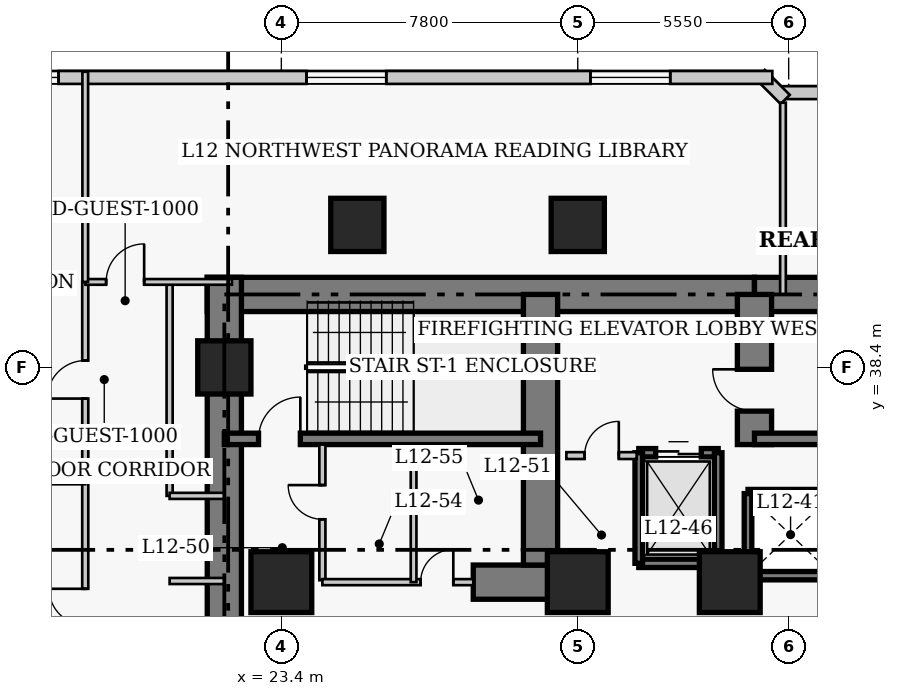
"""IFC4 building model, lengths in metres.
Left out: names, types, materials, properties, quantities, classifications, styles, units other than length and angle.
Written with IfcOpenShell. Run it as: python <this file> out.ifc"""

import sys

from ifc_helpers import new_model, si_unit, direction, frame, frame_2d, origin, origin_2d, place, context, subcontext, project, spatial, rectangle, extrude, element, fill, save


model = new_model("IFC4")
c1 = context("Model", 3, precision=1e-05, world=origin(), true_north=direction((0.0, 1.0)))
c2 = subcontext(c1, "Body", "Model", "MODEL_VIEW")
j1 = project(units=[si_unit("LENGTHUNIT", "METRE"), si_unit("PLANEANGLEUNIT", "RADIAN")], contexts=[c1])
p1 = place(None, origin())
s1 = spatial("IfcSite", under=j1, at=p1, CompositionType="ELEMENT")
p2 = place(p1, origin())
s2 = spatial("IfcBuilding", under=s1, at=p2, CompositionType="ELEMENT")
p3 = place(p2, frame((0.0, 0.0, 52.6)))
s3 = spatial("IfcBuildingStorey", under=s2, at=p3, CompositionType="ELEMENT", Elevation=52.6)
p4 = place(p3, frame((21.45, 40.32, 0.0), z_axis=(0.0, 0.0, 1.0), x_axis=(1.0, 0.0, 0.0)))
e1 = element("IfcWall", 1, at=p4, inside=s3, PredefinedType="SHEAR", context=c2, shape_type="SweptSolid", body=[
    extrude(rectangle(XDim=14.4, YDim=0.9, at=frame_2d((7.2, 0.0))), origin(), (0.0, 0.0, 1.0), 3.8),
])
p5 = place(p3, frame((35.85, 40.32, 0.0), z_axis=(0.0, 0.0, 1.0), x_axis=(1.0, 0.0, 0.0)))
e2 = element("IfcWall", 2, at=p5, inside=s3, PredefinedType="SHEAR", context=c2, shape_type="SweptSolid", body=[
    extrude(rectangle(XDim=12.6, YDim=0.9, at=frame_2d((6.3, 0.0))), origin(), (0.0, 0.0, 1.0), 3.8),
])
p6 = place(p3, frame((21.9, 27.05, 0.0), z_axis=(0.0, 0.0, 1.0), x_axis=(0.0, 1.0, 0.0)))
e3 = element("IfcWall", 3, at=p6, inside=s3, PredefinedType="SHEAR", context=c2, shape_type="SweptSolid", body=[
    extrude(rectangle(XDim=13.72, YDim=0.9, at=frame_2d((6.86, 0.0))), origin(), (0.0, 0.0, 1.0), 3.8),
])
p7 = place(p3, frame((28.45, 32.75, 0.0), z_axis=(0.0, 0.0, 1.0), x_axis=(1.0, 0.0, 0.0)))
e4 = element("IfcWall", 4, at=p7, inside=s3, PredefinedType="SHEAR", context=c2, shape_type="SweptSolid", body=[
    extrude(rectangle(XDim=2.4, YDim=0.9, at=frame_2d((1.2, 0.0))), origin(), (0.0, 0.0, 1.0), 3.8),
])
p8 = place(p3, frame((30.22, 33.2, 0.0), z_axis=(0.0, 0.0, 1.0), x_axis=(0.0, 1.0, 0.0)))
e5 = element("IfcWall", 5, at=p8, inside=s3, PredefinedType="SHEAR", context=c2, shape_type="SweptSolid", body=[
    extrude(rectangle(XDim=7.12, YDim=0.9, at=frame_2d((3.56, 0.0))), origin(), (0.0, 0.0, 1.0), 3.8),
])
p9 = place(p3, frame((35.85, 36.37, 0.0), z_axis=(0.0, 0.0, 1.0), x_axis=(0.0, 1.0, 0.0)))
e6 = element("IfcWall", 6, at=p9, inside=s3, PredefinedType="SHEAR", context=c2, shape_type="SweptSolid", body=[
    extrude(rectangle(XDim=3.95, YDim=0.9, at=frame_2d((1.975, 0.0))), origin(), (0.0, 0.0, 1.0), 3.8),
])
p10 = place(p9, frame((0.88, 0.0, 0.0)))
e7 = element("IfcOpeningElement", 7, at=p10, cuts=e6, PredefinedType="OPENING", context=c2, shape_type="SweptSolid", body=[
    extrude(rectangle(XDim=1.1, YDim=2.15, at=frame_2d((0.55, 1.075))), frame((0.0, 0.46, 0.0), z_axis=(0.0, -1.0, 0.0), x_axis=(1.0, 0.0, 0.0)), (0.0, 0.0, 1.0), 0.92),
])
p11 = place(p3, frame((21.9, 36.52, 0.0), z_axis=(0.0, 0.0, 1.0), x_axis=(1.0, 0.0, 0.0)))
e8 = element("IfcWall", 8, at=p11, inside=s3, PredefinedType="SHEAR", context=c2, shape_type="SweptSolid", body=[
    extrude(rectangle(XDim=8.32, YDim=0.3, at=frame_2d((4.16, 0.0))), origin(), (0.0, 0.0, 1.0), 3.8),
])
p12 = place(p11, frame((0.9, 0.0, 0.0)))
e9 = element("IfcOpeningElement", 9, at=p12, cuts=e8, PredefinedType="OPENING", context=c2, shape_type="SweptSolid", body=[
    extrude(rectangle(XDim=1.1, YDim=2.15, at=frame_2d((0.55, 1.075))), frame((0.0, 0.16, 0.0), z_axis=(0.0, -1.0, 0.0), x_axis=(1.0, 0.0, 0.0)), (0.0, 0.0, 1.0), 0.32),
])
p13 = place(p3, frame((35.85, 36.52, 0.0), z_axis=(0.0, 0.0, 1.0), x_axis=(1.0, 0.0, 0.0)))
e10 = element("IfcWall", 10, at=p13, inside=s3, PredefinedType="SHEAR", context=c2, shape_type="SweptSolid", body=[
    extrude(rectangle(XDim=8.33, YDim=0.3, at=frame_2d((4.165, 0.0))), origin(), (0.0, 0.0, 1.0), 3.8),
])
p14 = place(p3, frame((21.9, 38.4, 0.0), z_axis=(0.0, 0.0, 1.0), x_axis=(1.0, 0.0, 0.0)))
e11 = element("IfcColumn", 11, at=p14, inside=s3, PredefinedType="COLUMN", context=c2, shape_type="SweptSolid", body=[
    extrude(rectangle(XDim=1.4, YDim=1.4, at=origin_2d()), origin(), (0.0, 0.0, 1.0), 3.8),
])
for number, where, z_axis, x_axis in (
    (12, (23.4, 32.75, 0.0), (0.0, 0.0, 1.0), (1.0, 0.0, 0.0)),
    (13, (31.2, 32.75, 0.0), (0.0, 0.0, 1.0), (1.0, 0.0, 0.0)),
    (14, (35.2, 32.75, 0.0), (0.0, 0.0, 1.0), (1.0, 0.0, 0.0)),
):
    element("IfcColumn", number, at=place(p3, frame(where, z_axis=z_axis, x_axis=x_axis)), inside=s3, PredefinedType="COLUMN", context=c2, shape_type="SweptSolid", body=[
        extrude(rectangle(XDim=1.6, YDim=1.6, at=origin_2d()), origin(), (0.0, 0.0, 1.0), 3.8),
    ])
for number, where, z_axis, x_axis in (
    (15, (25.4, 42.15, 0.0), (0.0, 0.0, 1.0), (1.0, 0.0, 0.0)),
    (16, (31.2, 42.15, 0.0), (0.0, 0.0, 1.0), (1.0, 0.0, 0.0)),
):
    element("IfcColumn", number, at=place(p3, frame(where, z_axis=z_axis, x_axis=x_axis)), inside=s3, PredefinedType="COLUMN", context=c2, shape_type="SweptSolid", body=[
        extrude(rectangle(XDim=1.4, YDim=1.4, at=origin_2d()), origin(), (0.0, 0.0, 1.0), 3.8),
    ])
p15 = place(p3, frame((41.42, 45.63, 0.0), z_axis=(0.0, 0.0, 1.0), x_axis=(-1.0, 0.0, 0.0)))
e17 = element("IfcWall", 17, at=p15, inside=s3, PredefinedType="SOLIDWALL", context=c2, shape_type="SweptSolid", body=[
    extrude(rectangle(XDim=4.84, YDim=0.34, at=frame_2d((2.42, 0.0))), origin(), (0.0, 0.0, 1.0), 3.54),
])
p16 = place(p15, frame((1.37, 0.0, 0.85)))
e18 = element("IfcOpeningElement", 18, at=p16, cuts=e17, PredefinedType="OPENING", context=c2, shape_type="SweptSolid", body=[
    extrude(rectangle(XDim=2.1, YDim=1.85, at=frame_2d((1.05, 0.925))), frame((0.0, 0.18, 0.0), z_axis=(0.0, -1.0, 0.0), x_axis=(1.0, 0.0, 0.0)), (0.0, 0.0, 1.0), 0.36),
])
p17 = place(p3, frame((36.658, 45.451, 0.0), z_axis=(0.0, 0.0, 1.0), x_axis=(-0.707106781187, 0.707106781187, 0.0)))
e19 = element("IfcWall", 19, at=p17, inside=s3, PredefinedType="SOLIDWALL", context=c2, shape_type="SweptSolid", body=[
    extrude(rectangle(XDim=0.929, YDim=0.34, at=frame_2d((0.464, 0.0))), origin(), (0.0, 0.0, 1.0), 3.54),
])
p18 = place(p3, frame((36.32, 46.03, 0.0), z_axis=(0.0, 0.0, 1.0), x_axis=(-1.0, 0.0, 0.0)))
e20 = element("IfcWall", 20, at=p18, inside=s3, PredefinedType="SOLIDWALL", context=c2, shape_type="SweptSolid", body=[
    extrude(rectangle(XDim=29.89, YDim=0.34, at=frame_2d((14.945, 0.0))), origin(), (0.0, 0.0, 1.0), 3.54),
])
p19 = place(p18, frame((2.686, 0.0, 0.85)))
e21 = element("IfcOpeningElement", 21, at=p19, cuts=e20, PredefinedType="OPENING", context=c2, shape_type="SweptSolid", body=[
    extrude(rectangle(XDim=2.1, YDim=1.85, at=frame_2d((1.05, 0.925))), frame((0.0, 0.18, 0.0), z_axis=(0.0, -1.0, 0.0), x_axis=(1.0, 0.0, 0.0)), (0.0, 0.0, 1.0), 0.36),
])
p20 = place(p18, frame((10.159, 0.0, 0.85)))
e22 = element("IfcOpeningElement", 22, at=p20, cuts=e20, PredefinedType="OPENING", context=c2, shape_type="SweptSolid", body=[
    extrude(rectangle(XDim=2.1, YDim=1.85, at=frame_2d((1.05, 0.925))), frame((0.0, 0.18, 0.0), z_axis=(0.0, -1.0, 0.0), x_axis=(1.0, 0.0, 0.0)), (0.0, 0.0, 1.0), 0.36),
])
p21 = place(p18, frame((18.781, 0.0, 0.85)))
e23 = element("IfcOpeningElement", 23, at=p21, cuts=e20, PredefinedType="OPENING", context=c2, shape_type="SweptSolid", body=[
    extrude(rectangle(XDim=2.1, YDim=1.85, at=frame_2d((1.05, 0.925))), frame((0.0, 0.18, 0.0), z_axis=(0.0, -1.0, 0.0), x_axis=(1.0, 0.0, 0.0)), (0.0, 0.0, 1.0), 0.36),
])
p22 = place(p18, frame((25.104, 0.0, 0.85)))
e24 = element("IfcOpeningElement", 24, at=p22, cuts=e20, PredefinedType="OPENING", context=c2, shape_type="SweptSolid", body=[
    extrude(rectangle(XDim=2.1, YDim=1.85, at=frame_2d((1.05, 0.925))), frame((0.0, 0.18, 0.0), z_axis=(0.0, -1.0, 0.0), x_axis=(1.0, 0.0, 0.0)), (0.0, 0.0, 1.0), 0.36),
])
for number, where, z_axis, x_axis in (
    (25, (35.68, 35.08, 0.0), (0.0, 0.0, 1.0), (1.0, 0.0, 0.0)),
    (26, (35.68, 32.92, 0.0), (0.0, 0.0, 1.0), (1.0, 0.0, 0.0)),
):
    element("IfcWall", number, at=place(p3, frame(where, z_axis=z_axis, x_axis=x_axis)), inside=s3, PredefinedType="SHEAR", context=c2, shape_type="SweptSolid", body=[
        extrude(rectangle(XDim=2.32, YDim=0.22, at=frame_2d((1.16, 0.0))), origin(), (0.0, 0.0, 1.0), 3.8),
    ])
p23 = place(p3, frame((35.68, 32.92, 0.0), z_axis=(0.0, 0.0, 1.0), x_axis=(0.0, 1.0, 0.0)))
e27 = element("IfcWall", 27, at=p23, inside=s3, PredefinedType="SHEAR", context=c2, shape_type="SweptSolid", body=[
    extrude(rectangle(XDim=2.16, YDim=0.2, at=frame_2d((1.08, 0.0))), origin(), (0.0, 0.0, 1.0), 3.8),
])
p24 = place(p3, frame((32.805, 36.155, 0.0), z_axis=(0.0, 0.0, 1.0), x_axis=(1.0, 0.0, 0.0)))
e28 = element("IfcWall", 28, at=p24, inside=s3, PredefinedType="SHEAR", context=c2, shape_type="SweptSolid", body=[
    extrude(rectangle(XDim=2.09, YDim=0.22, at=frame_2d((1.045, 0.0))), origin(), (0.0, 0.0, 1.0), 3.8),
])
p25 = place(p24, frame((0.445, 0.0, 0.0)))
e29 = element("IfcOpeningElement", 29, at=p25, cuts=e28, PredefinedType="OPENING", context=c2, shape_type="SweptSolid", body=[
    extrude(rectangle(XDim=1.2, YDim=2.15, at=frame_2d((0.6, 1.075))), frame((0.0, 0.12, 0.0), z_axis=(0.0, -1.0, 0.0), x_axis=(1.0, 0.0, 0.0)), (0.0, 0.0, 1.0), 0.24),
])
p26 = place(p3, frame((32.805, 33.245, 0.0), z_axis=(0.0, 0.0, 1.0), x_axis=(1.0, 0.0, 0.0)))
e30 = element("IfcWall", 30, at=p26, inside=s3, PredefinedType="SHEAR", context=c2, shape_type="SweptSolid", body=[
    extrude(rectangle(XDim=2.09, YDim=0.22, at=frame_2d((1.045, 0.0))), origin(), (0.0, 0.0, 1.0), 3.8),
])
for number, where, z_axis, x_axis in (
    (31, (32.805, 33.245, 0.0), (0.0, 0.0, 1.0), (0.0, 1.0, 0.0)),
    (32, (34.895, 33.245, 0.0), (0.0, 0.0, 1.0), (0.0, 1.0, 0.0)),
):
    element("IfcWall", number, at=place(p3, frame(where, z_axis=z_axis, x_axis=x_axis)), inside=s3, PredefinedType="SHEAR", context=c2, shape_type="SweptSolid", body=[
        extrude(rectangle(XDim=2.91, YDim=0.2, at=frame_2d((1.455, 0.0))), origin(), (0.0, 0.0, 1.0), 3.8),
    ])
p27 = place(p3, frame((30.9, 36.08, 0.0), z_axis=(0.0, 0.0, 1.0), x_axis=(1.0, 0.0, 0.0)))
e33 = element("IfcWall", 33, at=p27, inside=s3, PredefinedType="PARTITIONING", context=c2, shape_type="SweptSolid", body=[
    extrude(rectangle(XDim=1.85, YDim=0.18, at=frame_2d((0.925, 0.0))), origin(), (0.0, 0.0, 1.0), 3.54),
])
p28 = place(p27, frame((0.48, 0.0, 0.0)))
e34 = element("IfcOpeningElement", 34, at=p28, cuts=e33, PredefinedType="OPENING", context=c2, shape_type="SweptSolid", body=[
    extrude(rectangle(XDim=0.9, YDim=2.15, at=frame_2d((0.45, 1.075))), frame((0.0, 0.1, 0.0), z_axis=(0.0, -1.0, 0.0), x_axis=(1.0, 0.0, 0.0)), (0.0, 0.0, 1.0), 0.2),
])
p29 = place(p3, frame((24.48, 32.8, 0.0), z_axis=(0.0, 0.0, 1.0), x_axis=(0.0, 1.0, 0.0)))
e35 = element("IfcWall", 35, at=p29, inside=s3, PredefinedType="PARTITIONING", context=c2, shape_type="SweptSolid", body=[
    extrude(rectangle(XDim=3.57, YDim=0.16, at=frame_2d((1.785, 0.0))), origin(), (0.0, 0.0, 1.0), 3.54),
])
p30 = place(p29, frame((1.604, 0.0, 0.0)))
e36 = element("IfcOpeningElement", 36, at=p30, cuts=e35, PredefinedType="OPENING", context=c2, shape_type="SweptSolid", body=[
    extrude(rectangle(XDim=0.9, YDim=2.1, at=frame_2d((0.45, 1.05))), frame((0.0, 0.09, 0.0), z_axis=(0.0, -1.0, 0.0), x_axis=(1.0, 0.0, 0.0)), (0.0, 0.0, 1.0), 0.18),
])
p31 = place(p3, frame((24.48, 32.75, 0.0), z_axis=(0.0, 0.0, 1.0), x_axis=(1.0, 0.0, 0.0)))
e37 = element("IfcWall", 37, at=p31, inside=s3, PredefinedType="PARTITIONING", context=c2, shape_type="SweptSolid", body=[
    extrude(rectangle(XDim=3.97, YDim=0.16, at=frame_2d((1.985, 0.0))), origin(), (0.0, 0.0, 1.0), 3.54),
])
p32 = place(p31, frame((2.585, 0.0, 0.0)))
e38 = element("IfcOpeningElement", 38, at=p32, cuts=e37, PredefinedType="OPENING", context=c2, shape_type="SweptSolid", body=[
    extrude(rectangle(XDim=0.86, YDim=2.05, at=frame_2d((0.43, 1.025))), frame((0.0, 0.09, 0.0), z_axis=(0.0, -1.0, 0.0), x_axis=(1.0, 0.0, 0.0)), (0.0, 0.0, 1.0), 0.18),
])
p33 = place(p3, frame((26.88, 32.75, 0.0), z_axis=(0.0, 0.0, 1.0), x_axis=(0.0, 1.0, 0.0)))
e39 = element("IfcWall", 39, at=p33, inside=s3, PredefinedType="PARTITIONING", context=c2, shape_type="SweptSolid", body=[
    extrude(rectangle(XDim=3.62, YDim=0.15, at=frame_2d((1.81, 0.0))), origin(), (0.0, 0.0, 1.0), 3.54),
])
p34 = place(p3, frame((18.24, 5.05, 0.0), z_axis=(0.0, 0.0, 1.0), x_axis=(0.0, 1.0, 0.0)))
e40 = element("IfcWall", 40, at=p34, inside=s3, PredefinedType="PARTITIONING", context=c2, shape_type="SweptSolid", body=[
    extrude(rectangle(XDim=35.6, YDim=0.16, at=frame_2d((17.8, 0.0))), origin(), (0.0, 0.0, 1.0), 3.54),
])
p35 = place(p34, frame((2.6, 0.0, 0.0)))
e41 = element("IfcOpeningElement", 41, at=p35, cuts=e40, PredefinedType="OPENING", context=c2, shape_type="SweptSolid", body=[
    extrude(rectangle(XDim=0.95, YDim=2.1, at=frame_2d((0.475, 1.05))), frame((0.0, 0.09, 0.0), z_axis=(0.0, -1.0, 0.0), x_axis=(1.0, 0.0, 0.0)), (0.0, 0.0, 1.0), 0.18),
])
p36 = place(p34, frame((10.075, 0.0, 0.0)))
e42 = element("IfcOpeningElement", 42, at=p36, cuts=e40, PredefinedType="OPENING", context=c2, shape_type="SweptSolid", body=[
    extrude(rectangle(XDim=0.95, YDim=2.1, at=frame_2d((0.475, 1.05))), frame((0.0, 0.09, 0.0), z_axis=(0.0, -1.0, 0.0), x_axis=(1.0, 0.0, 0.0)), (0.0, 0.0, 1.0), 0.18),
])
p37 = place(p34, frame((18.875, 0.0, 0.0)))
e43 = element("IfcOpeningElement", 43, at=p37, cuts=e40, PredefinedType="OPENING", context=c2, shape_type="SweptSolid", body=[
    extrude(rectangle(XDim=0.95, YDim=2.1, at=frame_2d((0.475, 1.05))), frame((0.0, 0.09, 0.0), z_axis=(0.0, -1.0, 0.0), x_axis=(1.0, 0.0, 0.0)), (0.0, 0.0, 1.0), 0.18),
])
p38 = place(p34, frame((26.575, 0.0, 0.0)))
e44 = element("IfcOpeningElement", 44, at=p38, cuts=e40, PredefinedType="OPENING", context=c2, shape_type="SweptSolid", body=[
    extrude(rectangle(XDim=0.95, YDim=2.1, at=frame_2d((0.475, 1.05))), frame((0.0, 0.09, 0.0), z_axis=(0.0, -1.0, 0.0), x_axis=(1.0, 0.0, 0.0)), (0.0, 0.0, 1.0), 0.18),
])
p39 = place(p34, frame((32.53, 0.0, 0.0)))
e45 = element("IfcOpeningElement", 45, at=p39, cuts=e40, PredefinedType="OPENING", context=c2, shape_type="SweptSolid", body=[
    extrude(rectangle(XDim=1.0, YDim=2.15, at=frame_2d((0.5, 1.075))), frame((0.0, 0.09, 0.0), z_axis=(0.0, -1.0, 0.0), x_axis=(1.0, 0.0, 0.0)), (0.0, 0.0, 1.0), 0.18),
])
p40 = place(p3, frame((20.46, 35.02, 0.0), z_axis=(0.0, 0.0, 1.0), x_axis=(0.0, 1.0, 0.0)))
e46 = element("IfcWall", 46, at=p40, inside=s3, PredefinedType="PARTITIONING", context=c2, shape_type="SweptSolid", body=[
    extrude(rectangle(XDim=5.63, YDim=0.16, at=frame_2d((2.815, 0.0))), origin(), (0.0, 0.0, 1.0), 3.54),
])
for number, where, z_axis, x_axis in (
    (47, (20.46, 35.02, 0.0), (0.0, 0.0, 1.0), (1.0, 0.0, 0.0)),
    (48, (20.46, 32.78, 0.0), (0.0, 0.0, 1.0), (1.0, 0.0, 0.0)),
):
    element("IfcWall", number, at=place(p3, frame(where, z_axis=z_axis, x_axis=x_axis)), inside=s3, PredefinedType="PARTITIONING", context=c2, shape_type="SweptSolid", body=[
        extrude(rectangle(XDim=1.44, YDim=0.16, at=frame_2d((0.72, 0.0))), origin(), (0.0, 0.0, 1.0), 3.54),
    ])
p41 = place(p3, frame((18.24, 40.65, 0.0), z_axis=(0.0, 0.0, 1.0), x_axis=(1.0, 0.0, 0.0)))
e49 = element("IfcWall", 49, at=p41, inside=s3, PredefinedType="PARTITIONING", context=c2, shape_type="SweptSolid", body=[
    extrude(rectangle(XDim=3.86, YDim=0.15, at=frame_2d((1.93, 0.0))), origin(), (0.0, 0.0, 1.0), 3.54),
])
p42 = place(p41, frame((0.55, 0.0, 0.0)))
e50 = element("IfcOpeningElement", 50, at=p42, cuts=e49, PredefinedType="OPENING", context=c2, shape_type="SweptSolid", body=[
    extrude(rectangle(XDim=1.0, YDim=2.15, at=frame_2d((0.5, 1.075))), frame((0.0, 0.085, 0.0), z_axis=(0.0, -1.0, 0.0), x_axis=(1.0, 0.0, 0.0)), (0.0, 0.0, 1.0), 0.17),
])
p43 = place(p3, frame((18.24, 40.65, 0.0), z_axis=(0.0, 0.0, 1.0), x_axis=(0.0, 1.0, 0.0)))
e51 = element("IfcWall", 51, at=p43, inside=s3, PredefinedType="PARTITIONING", context=c2, shape_type="SweptSolid", body=[
    extrude(rectangle(XDim=5.53, YDim=0.15, at=frame_2d((2.765, 0.0))), origin(), (0.0, 0.0, 1.0), 3.54),
])
p44 = place(p3, frame((36.6, 40.32, 0.0), z_axis=(0.0, 0.0, 1.0), x_axis=(0.0, 1.0, 0.0)))
e52 = element("IfcWall", 52, at=p44, inside=s3, PredefinedType="PARTITIONING", context=c2, shape_type="SweptSolid", body=[
    extrude(rectangle(XDim=5.045, YDim=0.15, at=frame_2d((2.522, 0.0))), origin(), (0.0, 0.0, 1.0), 3.54),
])
p45 = place(p3, frame((14.45, 35.4, 0.0), z_axis=(0.0, 0.0, 1.0), x_axis=(1.0, 0.0, 0.0)))
e53 = element("IfcWall", 53, at=p45, inside=s3, PredefinedType="PARTITIONING", context=c2, shape_type="SweptSolid", body=[
    extrude(rectangle(XDim=3.79, YDim=0.15, at=frame_2d((1.895, 0.0))), origin(), (0.0, 0.0, 1.0), 3.54),
])
p46 = place(p19, origin())
e54 = element("IfcWindow", 54, at=p46, inside=s3, PartitioningType="SINGLE_PANEL", PredefinedType="WINDOW", context=c2, shape_type="SweptSolid", body=[
    extrude(rectangle(XDim=2.1, YDim=1.85, at=frame_2d((1.05, 0.925))), frame((0.0, 0.03, 0.0), z_axis=(0.0, -1.0, 0.0), x_axis=(1.0, 0.0, 0.0)), (0.0, 0.0, 1.0), 0.06),
])
fill(e21, e54)
p47 = place(p20, origin())
e55 = element("IfcWindow", 55, at=p47, inside=s3, PartitioningType="SINGLE_PANEL", PredefinedType="WINDOW", context=c2, shape_type="SweptSolid", body=[
    extrude(rectangle(XDim=2.1, YDim=1.85, at=frame_2d((1.05, 0.925))), frame((0.0, 0.03, 0.0), z_axis=(0.0, -1.0, 0.0), x_axis=(1.0, 0.0, 0.0)), (0.0, 0.0, 1.0), 0.06),
])
fill(e22, e55)
p48 = place(p21, origin())
e56 = element("IfcWindow", 56, at=p48, inside=s3, PartitioningType="SINGLE_PANEL", PredefinedType="WINDOW", context=c2, shape_type="SweptSolid", body=[
    extrude(rectangle(XDim=2.1, YDim=1.85, at=frame_2d((1.05, 0.925))), frame((0.0, 0.03, 0.0), z_axis=(0.0, -1.0, 0.0), x_axis=(1.0, 0.0, 0.0)), (0.0, 0.0, 1.0), 0.06),
])
fill(e23, e56)
p49 = place(p25, origin())
e57 = element("IfcDoor", 57, at=p49, inside=s3, OperationType="DOUBLE_DOOR_SLIDING", PredefinedType="DOOR", context=c2, shape_type="SweptSolid", body=[
    extrude(rectangle(XDim=1.2, YDim=2.15, at=frame_2d((0.6, 1.075))), frame((0.0, 0.025, 0.0), z_axis=(0.0, -1.0, 0.0), x_axis=(1.0, 0.0, 0.0)), (0.0, 0.0, 1.0), 0.05),
])
fill(e29, e57)
p50 = place(p28, origin())
e58 = element("IfcDoor", 58, at=p50, inside=s3, OperationType="SINGLE_SWING_RIGHT", PredefinedType="DOOR", context=c2, shape_type="SweptSolid", body=[
    extrude(rectangle(XDim=0.9, YDim=2.15, at=frame_2d((0.45, 1.075))), frame((0.0, 0.025, 0.0), z_axis=(0.0, -1.0, 0.0), x_axis=(1.0, 0.0, 0.0)), (0.0, 0.0, 1.0), 0.05),
])
fill(e34, e58)
p51 = place(p30, origin())
e59 = element("IfcDoor", 59, at=p51, inside=s3, OperationType="SINGLE_SWING_RIGHT", PredefinedType="DOOR", context=c2, shape_type="SweptSolid", body=[
    extrude(rectangle(XDim=0.9, YDim=2.1, at=frame_2d((0.45, 1.05))), frame((0.0, 0.025, 0.0), z_axis=(0.0, -1.0, 0.0), x_axis=(1.0, 0.0, 0.0)), (0.0, 0.0, 1.0), 0.05),
])
fill(e36, e59)
p52 = place(p32, origin())
e60 = element("IfcDoor", 60, at=p52, inside=s3, OperationType="SINGLE_SWING_RIGHT", PredefinedType="DOOR", context=c2, shape_type="SweptSolid", body=[
    extrude(rectangle(XDim=0.86, YDim=2.05, at=frame_2d((0.43, 1.025))), frame((0.0, 0.025, 0.0), z_axis=(0.0, -1.0, 0.0), x_axis=(1.0, 0.0, 0.0)), (0.0, 0.0, 1.0), 0.05),
])
fill(e38, e60)
p53 = place(p42, origin())
e61 = element("IfcDoor", 61, at=p53, inside=s3, OperationType="SINGLE_SWING_RIGHT", PredefinedType="DOOR", context=c2, shape_type="SweptSolid", body=[
    extrude(rectangle(XDim=1.0, YDim=2.15, at=frame_2d((0.5, 1.075))), frame((0.0, 0.025, 0.0), z_axis=(0.0, -1.0, 0.0), x_axis=(1.0, 0.0, 0.0)), (0.0, 0.0, 1.0), 0.05),
])
fill(e50, e61)
p54 = place(p38, origin())
e62 = element("IfcDoor", 62, at=p54, inside=s3, OperationType="SINGLE_SWING_RIGHT", PredefinedType="DOOR", context=c2, shape_type="SweptSolid", body=[
    extrude(rectangle(XDim=0.95, YDim=2.1, at=frame_2d((0.475, 1.05))), frame((0.0, 0.025, 0.0), z_axis=(0.0, -1.0, 0.0), x_axis=(1.0, 0.0, 0.0)), (0.0, 0.0, 1.0), 0.05),
])
fill(e44, e62)
p55 = place(p39, origin())
e63 = element("IfcDoor", 63, at=p55, inside=s3, OperationType="SINGLE_SWING_LEFT", PredefinedType="DOOR", context=c2, shape_type="SweptSolid", body=[
    extrude(rectangle(XDim=1.0, YDim=2.15, at=frame_2d((0.5, 1.075))), frame((0.0, 0.025, 0.0), z_axis=(0.0, -1.0, 0.0), x_axis=(1.0, 0.0, 0.0)), (0.0, 0.0, 1.0), 0.05),
])
fill(e45, e63)
p56 = place(p12, origin())
e64 = element("IfcDoor", 64, at=p56, inside=s3, OperationType="SINGLE_SWING_RIGHT", PredefinedType="DOOR", context=c2, shape_type="SweptSolid", body=[
    extrude(rectangle(XDim=1.1, YDim=2.15, at=frame_2d((0.55, 1.075))), frame((0.0, 0.025, 0.0), z_axis=(0.0, -1.0, 0.0), x_axis=(1.0, 0.0, 0.0)), (0.0, 0.0, 1.0), 0.05),
])
fill(e9, e64)
p57 = place(p10, origin())
e65 = element("IfcDoor", 65, at=p57, inside=s3, OperationType="SINGLE_SWING_RIGHT", PredefinedType="DOOR", context=c2, shape_type="SweptSolid", body=[
    extrude(rectangle(XDim=1.1, YDim=2.15, at=frame_2d((0.55, 1.075))), frame((0.0, 0.025, 0.0), z_axis=(0.0, -1.0, 0.0), x_axis=(1.0, 0.0, 0.0)), (0.0, 0.0, 1.0), 0.05),
])
fill(e7, e65)
save(model, sys.argv[1])
